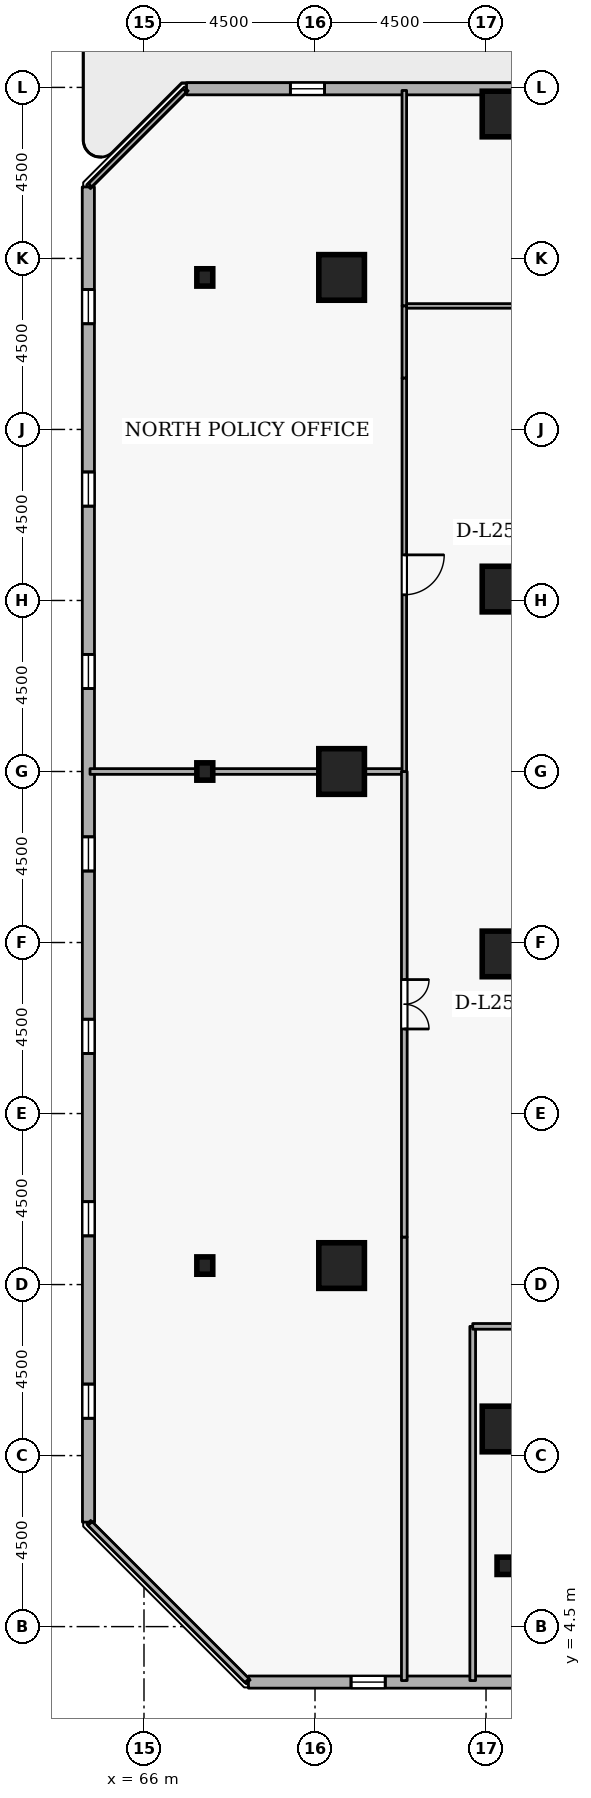
"""IFC4 building model, lengths in metres.
Left out: names, types, materials, properties, quantities, classifications, styles, units other than length and angle.
Written with IfcOpenShell. Run it as: python <this file> out.ifc"""

import sys

from ifc_helpers import new_model, si_unit, direction, frame, frame_2d, origin, origin_2d, place, context, subcontext, project, spatial, rectangle, i_section, extrude, element, fill, save


model = new_model("IFC4")
c1 = context("Model", 3, precision=1e-05, world=origin(), true_north=direction((0.0, 1.0)))
c2 = subcontext(c1, "Body", "Model", "MODEL_VIEW")
j1 = project(units=[si_unit("LENGTHUNIT", "METRE"), si_unit("PLANEANGLEUNIT", "RADIAN")], contexts=[c1])
p1 = place(None, origin())
s1 = spatial("IfcSite", under=j1, at=p1, CompositionType="ELEMENT")
p2 = place(p1, origin())
s2 = spatial("IfcBuilding", under=s1, at=p2, CompositionType="ELEMENT")
p3 = place(p2, frame((0.0, 0.0, 98.1)))
s3 = spatial("IfcBuildingStorey", under=s2, at=p3, CompositionType="ELEMENT", Elevation=98.1)
for number, where, z_axis, x_axis in (
    (1, (75.5, 44.3, 0.0), (0.0, 0.0, 1.0), (1.0, 0.0, 0.0)),
    (2, (71.2, 14.0, 0.0), (0.0, 0.0, 1.0), (1.0, 0.0, 0.0)),
    (3, (71.2, 27.0, 0.0), (0.0, 0.0, 1.0), (1.0, 0.0, 0.0)),
    (4, (71.2, 40.0, 0.0), (0.0, 0.0, 1.0), (1.0, 0.0, 0.0)),
    (5, (75.5, 9.7, 0.0), (0.0, 0.0, 1.0), (1.0, 0.0, 0.0)),
    (6, (75.5, 22.2, 0.0), (0.0, 0.0, 1.0), (1.0, 0.0, 0.0)),
    (7, (75.5, 31.8, 0.0), (0.0, 0.0, 1.0), (1.0, 0.0, 0.0)),
):
    element("IfcColumn", number, at=place(p3, frame(where, z_axis=z_axis, x_axis=x_axis)), inside=s3, PredefinedType="COLUMN", context=c2, shape_type="SweptSolid", body=[
        extrude(rectangle(XDim=1.2, YDim=1.2, at=origin_2d()), origin(), (0.0, 0.0, 1.0), 3.6),
    ])
for number, where, z_axis, x_axis in (
    (8, (67.6, 14.0, 0.0), (0.0, 0.0, 1.0), (1.0, 0.0, 0.0)),
    (9, (67.6, 27.0, 0.0), (0.0, 0.0, 1.0), (1.0, 0.0, 0.0)),
    (10, (67.6, 40.0, 0.0), (0.0, 0.0, 1.0), (1.0, 0.0, 0.0)),
    (11, (75.5, 6.1, 0.0), (0.0, 0.0, 1.0), (1.0, 0.0, 0.0)),
):
    element("IfcColumn", number, at=place(p3, frame(where, z_axis=z_axis, x_axis=x_axis)), inside=s3, PredefinedType="COLUMN", context=c2, shape_type="SweptSolid", body=[
        extrude(i_section(OverallWidth=0.418, OverallDepth=0.456, WebThickness=0.042, FlangeThickness=0.067, FilletRadius=0.015, at=origin_2d()), origin(), (0.0, 0.0, 1.0), 3.6),
    ])
p4 = place(p3, frame((68.748, 3.041, 0.0), z_axis=(0.0, 0.0, 1.0), x_axis=(0.999999989352, -0.000145929605, 0.0)))
e12 = element("IfcWall", 12, at=p4, inside=s3, PredefinedType="STANDARD", context=c2, shape_type="SweptSolid", body=[
    extrude(rectangle(XDim=35.133, YDim=0.32, at=frame_2d((17.566, 0.0))), origin(), (0.0, 0.0, 1.0), 2.7),
])
p5 = place(p4, frame((2.7, 0.0, 0.72)))
e13 = element("IfcOpeningElement", 13, at=p5, cuts=e12, PredefinedType="OPENING", context=c2, shape_type="SweptSolid", body=[
    extrude(rectangle(XDim=0.9, YDim=1.75, at=frame_2d((0.45, 0.875))), frame((0.0, 0.17, 0.0), z_axis=(0.0, -1.0, 0.0), x_axis=(1.0, 0.0, 0.0)), (0.0, 0.0, 1.0), 0.34),
])
p6 = place(p4, frame((7.5, 0.0, 0.72)))
e14 = element("IfcOpeningElement", 14, at=p6, cuts=e12, PredefinedType="OPENING", context=c2, shape_type="SweptSolid", body=[
    extrude(rectangle(XDim=0.9, YDim=1.75, at=frame_2d((0.45, 0.875))), frame((0.0, 0.17, 0.0), z_axis=(0.0, -1.0, 0.0), x_axis=(1.0, 0.0, 0.0)), (0.0, 0.0, 1.0), 0.34),
])
p7 = place(p4, frame((12.3, 0.0, 0.72)))
e15 = element("IfcOpeningElement", 15, at=p7, cuts=e12, PredefinedType="OPENING", context=c2, shape_type="SweptSolid", body=[
    extrude(rectangle(XDim=0.9, YDim=1.75, at=frame_2d((0.45, 0.875))), frame((0.0, 0.17, 0.0), z_axis=(0.0, -1.0, 0.0), x_axis=(1.0, 0.0, 0.0)), (0.0, 0.0, 1.0), 0.34),
])
p8 = place(p4, frame((17.1, 0.0, 0.72)))
e16 = element("IfcOpeningElement", 16, at=p8, cuts=e12, PredefinedType="OPENING", context=c2, shape_type="SweptSolid", body=[
    extrude(rectangle(XDim=0.9, YDim=1.75, at=frame_2d((0.45, 0.875))), frame((0.0, 0.17, 0.0), z_axis=(0.0, -1.0, 0.0), x_axis=(1.0, 0.0, 0.0)), (0.0, 0.0, 1.0), 0.34),
])
p9 = place(p4, frame((21.9, 0.0, 0.72)))
e17 = element("IfcOpeningElement", 17, at=p9, cuts=e12, PredefinedType="OPENING", context=c2, shape_type="SweptSolid", body=[
    extrude(rectangle(XDim=0.9, YDim=1.75, at=frame_2d((0.45, 0.875))), frame((0.0, 0.17, 0.0), z_axis=(0.0, -1.0, 0.0), x_axis=(1.0, 0.0, 0.0)), (0.0, 0.0, 1.0), 0.34),
])
p10 = place(p4, frame((26.7, 0.0, 0.72)))
e18 = element("IfcOpeningElement", 18, at=p10, cuts=e12, PredefinedType="OPENING", context=c2, shape_type="SweptSolid", body=[
    extrude(rectangle(XDim=0.9, YDim=1.75, at=frame_2d((0.45, 0.875))), frame((0.0, 0.17, 0.0), z_axis=(0.0, -1.0, 0.0), x_axis=(1.0, 0.0, 0.0)), (0.0, 0.0, 1.0), 0.34),
])
p11 = place(p4, frame((31.5, 0.0, 0.72)))
e19 = element("IfcOpeningElement", 19, at=p11, cuts=e12, PredefinedType="OPENING", context=c2, shape_type="SweptSolid", body=[
    extrude(rectangle(XDim=0.9, YDim=1.75, at=frame_2d((0.45, 0.875))), frame((0.0, 0.17, 0.0), z_axis=(0.0, -1.0, 0.0), x_axis=(1.0, 0.0, 0.0)), (0.0, 0.0, 1.0), 0.34),
])
p12 = place(p3, frame((102.252, 44.959, 0.0), z_axis=(0.0, 0.0, 1.0), x_axis=(-0.999999989352, 0.000145929605, 0.0)))
e20 = element("IfcWall", 20, at=p12, inside=s3, PredefinedType="STANDARD", context=c2, shape_type="SweptSolid", body=[
    extrude(rectangle(XDim=35.133, YDim=0.32, at=frame_2d((17.566, 0.0))), origin(), (0.0, 0.0, 1.0), 2.7),
])
p13 = place(p12, frame((19.292, 0.0, 0.0)))
e21 = element("IfcOpeningElement", 21, at=p13, cuts=e20, PredefinedType="OPENING", context=c2, shape_type="SweptSolid", body=[
    extrude(rectangle(XDim=1.15, YDim=2.1, at=frame_2d((0.575, 1.05))), frame((0.0, 0.17, 0.0), z_axis=(0.0, -1.0, 0.0), x_axis=(1.0, 0.0, 0.0)), (0.0, 0.0, 1.0), 0.34),
])
p14 = place(p12, frame((2.7, 0.0, 0.72)))
e22 = element("IfcOpeningElement", 22, at=p14, cuts=e20, PredefinedType="OPENING", context=c2, shape_type="SweptSolid", body=[
    extrude(rectangle(XDim=0.9, YDim=1.75, at=frame_2d((0.45, 0.875))), frame((0.0, 0.17, 0.0), z_axis=(0.0, -1.0, 0.0), x_axis=(1.0, 0.0, 0.0)), (0.0, 0.0, 1.0), 0.34),
])
p15 = place(p12, frame((7.5, 0.0, 0.72)))
e23 = element("IfcOpeningElement", 23, at=p15, cuts=e20, PredefinedType="OPENING", context=c2, shape_type="SweptSolid", body=[
    extrude(rectangle(XDim=0.9, YDim=1.75, at=frame_2d((0.45, 0.875))), frame((0.0, 0.17, 0.0), z_axis=(0.0, -1.0, 0.0), x_axis=(1.0, 0.0, 0.0)), (0.0, 0.0, 1.0), 0.34),
])
p16 = place(p12, frame((17.1, 0.0, 0.72)))
e24 = element("IfcOpeningElement", 24, at=p16, cuts=e20, PredefinedType="OPENING", context=c2, shape_type="SweptSolid", body=[
    extrude(rectangle(XDim=0.9, YDim=1.75, at=frame_2d((0.45, 0.875))), frame((0.0, 0.17, 0.0), z_axis=(0.0, -1.0, 0.0), x_axis=(1.0, 0.0, 0.0)), (0.0, 0.0, 1.0), 0.34),
])
p17 = place(p12, frame((21.9, 0.0, 0.72)))
e25 = element("IfcOpeningElement", 25, at=p17, cuts=e20, PredefinedType="OPENING", context=c2, shape_type="SweptSolid", body=[
    extrude(rectangle(XDim=0.9, YDim=1.75, at=frame_2d((0.45, 0.875))), frame((0.0, 0.17, 0.0), z_axis=(0.0, -1.0, 0.0), x_axis=(1.0, 0.0, 0.0)), (0.0, 0.0, 1.0), 0.34),
])
p18 = place(p12, frame((31.5, 0.0, 0.72)))
e26 = element("IfcOpeningElement", 26, at=p18, cuts=e20, PredefinedType="OPENING", context=c2, shape_type="SweptSolid", body=[
    extrude(rectangle(XDim=0.9, YDim=1.75, at=frame_2d((0.45, 0.875))), frame((0.0, 0.17, 0.0), z_axis=(0.0, -1.0, 0.0), x_axis=(1.0, 0.0, 0.0)), (0.0, 0.0, 1.0), 0.34),
])
p19 = place(p3, frame((64.535, 42.381, 0.0), z_axis=(0.0, 0.0, 1.0), x_axis=(0.000145929605, -0.999999989352, 0.0)))
e27 = element("IfcWall", 27, at=p19, inside=s3, PredefinedType="STANDARD", context=c2, shape_type="SweptSolid", body=[
    extrude(rectangle(XDim=35.133, YDim=0.32, at=frame_2d((17.566, 0.0))), origin(), (0.0, 0.0, 1.0), 2.7),
])
p20 = place(p19, frame((2.7, 0.0, 0.72)))
e28 = element("IfcOpeningElement", 28, at=p20, cuts=e27, PredefinedType="OPENING", context=c2, shape_type="SweptSolid", body=[
    extrude(rectangle(XDim=0.9, YDim=1.75, at=frame_2d((0.45, 0.875))), frame((0.0, 0.17, 0.0), z_axis=(0.0, -1.0, 0.0), x_axis=(1.0, 0.0, 0.0)), (0.0, 0.0, 1.0), 0.34),
])
p21 = place(p19, frame((7.5, 0.0, 0.72)))
e29 = element("IfcOpeningElement", 29, at=p21, cuts=e27, PredefinedType="OPENING", context=c2, shape_type="SweptSolid", body=[
    extrude(rectangle(XDim=0.9, YDim=1.75, at=frame_2d((0.45, 0.875))), frame((0.0, 0.17, 0.0), z_axis=(0.0, -1.0, 0.0), x_axis=(1.0, 0.0, 0.0)), (0.0, 0.0, 1.0), 0.34),
])
p22 = place(p19, frame((12.3, 0.0, 0.72)))
e30 = element("IfcOpeningElement", 30, at=p22, cuts=e27, PredefinedType="OPENING", context=c2, shape_type="SweptSolid", body=[
    extrude(rectangle(XDim=0.9, YDim=1.75, at=frame_2d((0.45, 0.875))), frame((0.0, 0.17, 0.0), z_axis=(0.0, -1.0, 0.0), x_axis=(1.0, 0.0, 0.0)), (0.0, 0.0, 1.0), 0.34),
])
p23 = place(p19, frame((17.1, 0.0, 0.72)))
e31 = element("IfcOpeningElement", 31, at=p23, cuts=e27, PredefinedType="OPENING", context=c2, shape_type="SweptSolid", body=[
    extrude(rectangle(XDim=0.9, YDim=1.75, at=frame_2d((0.45, 0.875))), frame((0.0, 0.17, 0.0), z_axis=(0.0, -1.0, 0.0), x_axis=(1.0, 0.0, 0.0)), (0.0, 0.0, 1.0), 0.34),
])
p24 = place(p19, frame((21.9, 0.0, 0.72)))
e32 = element("IfcOpeningElement", 32, at=p24, cuts=e27, PredefinedType="OPENING", context=c2, shape_type="SweptSolid", body=[
    extrude(rectangle(XDim=0.9, YDim=1.75, at=frame_2d((0.45, 0.875))), frame((0.0, 0.17, 0.0), z_axis=(0.0, -1.0, 0.0), x_axis=(1.0, 0.0, 0.0)), (0.0, 0.0, 1.0), 0.34),
])
p25 = place(p19, frame((26.7, 0.0, 0.72)))
e33 = element("IfcOpeningElement", 33, at=p25, cuts=e27, PredefinedType="OPENING", context=c2, shape_type="SweptSolid", body=[
    extrude(rectangle(XDim=0.9, YDim=1.75, at=frame_2d((0.45, 0.875))), frame((0.0, 0.17, 0.0), z_axis=(0.0, -1.0, 0.0), x_axis=(1.0, 0.0, 0.0)), (0.0, 0.0, 1.0), 0.34),
])
p26 = place(p19, frame((31.5, 0.0, 0.72)))
e34 = element("IfcOpeningElement", 34, at=p26, cuts=e27, PredefinedType="OPENING", context=c2, shape_type="SweptSolid", body=[
    extrude(rectangle(XDim=0.9, YDim=1.75, at=frame_2d((0.45, 0.875))), frame((0.0, 0.17, 0.0), z_axis=(0.0, -1.0, 0.0), x_axis=(1.0, 0.0, 0.0)), (0.0, 0.0, 1.0), 0.34),
])
p27 = place(p3, frame((74.65, 3.08, 0.0), z_axis=(0.0, 0.0, 1.0), x_axis=(0.0, 1.0, 0.0)))
e35 = element("IfcWall", 35, at=p27, inside=s3, PredefinedType="PARTITIONING", context=c2, shape_type="SweptSolid", body=[
    extrude(rectangle(XDim=9.32, YDim=0.15, at=frame_2d((4.66, 0.0))), origin(), (0.0, 0.0, 1.0), 3.3),
])
p28 = place(p3, frame((74.65, 12.4, 0.0), z_axis=(0.0, 0.0, 1.0), x_axis=(1.0, 0.0, 0.0)))
e36 = element("IfcWall", 36, at=p28, inside=s3, PredefinedType="PARTITIONING", context=c2, shape_type="SweptSolid", body=[
    extrude(rectangle(XDim=4.802, YDim=0.15, at=frame_2d((2.401, 0.0))), origin(), (0.0, 0.0, 1.0), 3.3),
])
p29 = place(p3, frame((82.2, 39.25, 0.0), z_axis=(0.0, 0.0, 1.0), x_axis=(-1.0, 0.0, 0.0)))
e37 = element("IfcWall", 37, at=p29, inside=s3, PredefinedType="PARTITIONING", context=c2, shape_type="SweptSolid", body=[
    extrude(rectangle(XDim=9.35, YDim=0.12, at=frame_2d((4.675, 0.0))), origin(), (0.0, 0.0, 1.0), 3.3),
])
p30 = place(p29, frame((4.15, 0.0, 0.0)))
e38 = element("IfcOpeningElement", 38, at=p30, cuts=e37, PredefinedType="OPENING", context=c2, shape_type="SweptSolid", body=[
    extrude(rectangle(XDim=1.05, YDim=2.1, at=frame_2d((0.525, 1.05))), frame((0.0, 0.07, 0.0), z_axis=(0.0, -1.0, 0.0), x_axis=(1.0, 0.0, 0.0)), (0.0, 0.0, 1.0), 0.14),
])
p31 = place(p3, frame((72.85, 39.25, 0.0), z_axis=(0.0, 0.0, 1.0), x_axis=(0.0, 1.0, 0.0)))
e39 = element("IfcWall", 39, at=p31, inside=s3, PredefinedType="PARTITIONING", context=c2, shape_type="SweptSolid", body=[
    extrude(rectangle(XDim=5.67, YDim=0.12, at=frame_2d((2.835, 0.0))), origin(), (0.0, 0.0, 1.0), 3.3),
])
p32 = place(p3, frame((72.85, 14.75, 0.0), z_axis=(0.0, 0.0, 1.0), x_axis=(0.0, -1.0, 0.0)))
e40 = element("IfcWall", 40, at=p32, inside=s3, PredefinedType="PARTITIONING", context=c2, shape_type="SweptSolid", body=[
    extrude(rectangle(XDim=11.67, YDim=0.15, at=frame_2d((5.835, 0.0))), origin(), (0.0, 0.0, 1.0), 3.3),
])
p33 = place(p3, frame((68.711, 3.08, 0.0), z_axis=(0.0, 0.0, 1.0), x_axis=(-0.707106781187, 0.707106781187, 0.0)))
e41 = element("IfcWall", 41, at=p33, inside=s3, PredefinedType="PARTITIONING", context=c2, shape_type="SweptSolid", body=[
    extrude(rectangle(XDim=5.842, YDim=0.15, at=frame_2d((2.921, 0.0))), origin(), (0.0, 0.0, 1.0), 3.3),
])
p34 = place(p3, frame((64.58, 27.0, 0.0), z_axis=(0.0, 0.0, 1.0), x_axis=(1.0, 0.0, 0.0)))
e42 = element("IfcWall", 42, at=p34, inside=s3, PredefinedType="PARTITIONING", context=c2, shape_type="SweptSolid", body=[
    extrude(rectangle(XDim=8.27, YDim=0.15, at=frame_2d((4.135, 0.0))), origin(), (0.0, 0.0, 1.0), 2.838),
])
p35 = place(p3, frame((72.85, 27.0, 0.0), z_axis=(0.0, 0.0, 1.0), x_axis=(0.0, -1.0, 0.0)))
e43 = element("IfcWall", 43, at=p35, inside=s3, PredefinedType="PARTITIONING", context=c2, shape_type="SweptSolid", body=[
    extrude(rectangle(XDim=12.25, YDim=0.15, at=frame_2d((6.125, 0.0))), origin(), (0.0, 0.0, 1.0), 3.3),
])
p36 = place(p35, frame((5.475, 0.0, 0.0)))
e44 = element("IfcOpeningElement", 44, at=p36, cuts=e43, PredefinedType="OPENING", context=c2, shape_type="SweptSolid", body=[
    extrude(rectangle(XDim=1.3, YDim=2.12, at=frame_2d((0.65, 1.06))), frame((0.0, 0.085, 0.0), z_axis=(0.0, -1.0, 0.0), x_axis=(1.0, 0.0, 0.0)), (0.0, 0.0, 1.0), 0.17),
])
p37 = place(p3, frame((64.58, 42.425, 0.0), z_axis=(0.0, 0.0, 1.0), x_axis=(0.707106781187, 0.707106781187, 0.0)))
e45 = element("IfcWall", 45, at=p37, inside=s3, PredefinedType="PARTITIONING", context=c2, shape_type="SweptSolid", body=[
    extrude(rectangle(XDim=3.528, YDim=0.12, at=frame_2d((1.764, 0.0))), origin(), (0.0, 0.0, 1.0), 3.3),
])
p38 = place(p3, frame((72.85, 39.25, 0.0), z_axis=(0.0, 0.0, 1.0), x_axis=(0.0, -1.0, 0.0)))
e46 = element("IfcWall", 46, at=p38, inside=s3, PredefinedType="PARTITIONING", context=c2, shape_type="SweptSolid", body=[
    extrude(rectangle(XDim=1.9, YDim=0.12, at=frame_2d((0.95, 0.0))), origin(), (0.0, 0.0, 1.0), 3.3),
])
p39 = place(p3, frame((72.85, 37.35, 0.0), z_axis=(0.0, 0.0, 1.0), x_axis=(0.0, -1.0, 0.0)))
e47 = element("IfcWall", 47, at=p39, inside=s3, PredefinedType="PARTITIONING", context=c2, shape_type="SweptSolid", body=[
    extrude(rectangle(XDim=10.35, YDim=0.12, at=frame_2d((5.175, 0.0))), origin(), (0.0, 0.0, 1.0), 2.855),
])
p40 = place(p39, frame((4.65, 0.0, 0.0)))
e48 = element("IfcOpeningElement", 48, at=p40, cuts=e47, PredefinedType="OPENING", context=c2, shape_type="SweptSolid", body=[
    extrude(rectangle(XDim=1.05, YDim=2.1, at=frame_2d((0.525, 1.05))), frame((0.0, 0.07, 0.0), z_axis=(0.0, -1.0, 0.0), x_axis=(1.0, 0.0, 0.0)), (0.0, 0.0, 1.0), 0.14),
])
p41 = place(p5, origin())
e49 = element("IfcWindow", 49, at=p41, inside=s3, PartitioningType="SINGLE_PANEL", PredefinedType="WINDOW", context=c2, shape_type="SweptSolid", body=[
    extrude(rectangle(XDim=0.9, YDim=1.75, at=frame_2d((0.45, 0.875))), frame((0.0, 0.03, 0.0), z_axis=(0.0, -1.0, 0.0), x_axis=(1.0, 0.0, 0.0)), (0.0, 0.0, 1.0), 0.06),
])
fill(e13, e49)
p42 = place(p18, origin())
e50 = element("IfcWindow", 50, at=p42, inside=s3, PartitioningType="SINGLE_PANEL", PredefinedType="WINDOW", context=c2, shape_type="SweptSolid", body=[
    extrude(rectangle(XDim=0.9, YDim=1.75, at=frame_2d((0.45, 0.875))), frame((0.0, 0.03, 0.0), z_axis=(0.0, -1.0, 0.0), x_axis=(1.0, 0.0, 0.0)), (0.0, 0.0, 1.0), 0.06),
])
fill(e26, e50)
p43 = place(p20, origin())
e51 = element("IfcWindow", 51, at=p43, inside=s3, PartitioningType="SINGLE_PANEL", PredefinedType="WINDOW", context=c2, shape_type="SweptSolid", body=[
    extrude(rectangle(XDim=0.9, YDim=1.75, at=frame_2d((0.45, 0.875))), frame((0.0, 0.03, 0.0), z_axis=(0.0, -1.0, 0.0), x_axis=(1.0, 0.0, 0.0)), (0.0, 0.0, 1.0), 0.06),
])
fill(e28, e51)
p44 = place(p21, origin())
e52 = element("IfcWindow", 52, at=p44, inside=s3, PartitioningType="SINGLE_PANEL", PredefinedType="WINDOW", context=c2, shape_type="SweptSolid", body=[
    extrude(rectangle(XDim=0.9, YDim=1.75, at=frame_2d((0.45, 0.875))), frame((0.0, 0.03, 0.0), z_axis=(0.0, -1.0, 0.0), x_axis=(1.0, 0.0, 0.0)), (0.0, 0.0, 1.0), 0.06),
])
fill(e29, e52)
p45 = place(p22, origin())
e53 = element("IfcWindow", 53, at=p45, inside=s3, PartitioningType="SINGLE_PANEL", PredefinedType="WINDOW", context=c2, shape_type="SweptSolid", body=[
    extrude(rectangle(XDim=0.9, YDim=1.75, at=frame_2d((0.45, 0.875))), frame((0.0, 0.03, 0.0), z_axis=(0.0, -1.0, 0.0), x_axis=(1.0, 0.0, 0.0)), (0.0, 0.0, 1.0), 0.06),
])
fill(e30, e53)
p46 = place(p23, origin())
e54 = element("IfcWindow", 54, at=p46, inside=s3, PartitioningType="SINGLE_PANEL", PredefinedType="WINDOW", context=c2, shape_type="SweptSolid", body=[
    extrude(rectangle(XDim=0.9, YDim=1.75, at=frame_2d((0.45, 0.875))), frame((0.0, 0.03, 0.0), z_axis=(0.0, -1.0, 0.0), x_axis=(1.0, 0.0, 0.0)), (0.0, 0.0, 1.0), 0.06),
])
fill(e31, e54)
p47 = place(p24, origin())
e55 = element("IfcWindow", 55, at=p47, inside=s3, PartitioningType="SINGLE_PANEL", PredefinedType="WINDOW", context=c2, shape_type="SweptSolid", body=[
    extrude(rectangle(XDim=0.9, YDim=1.75, at=frame_2d((0.45, 0.875))), frame((0.0, 0.03, 0.0), z_axis=(0.0, -1.0, 0.0), x_axis=(1.0, 0.0, 0.0)), (0.0, 0.0, 1.0), 0.06),
])
fill(e32, e55)
p48 = place(p25, origin())
e56 = element("IfcWindow", 56, at=p48, inside=s3, PartitioningType="SINGLE_PANEL", PredefinedType="WINDOW", context=c2, shape_type="SweptSolid", body=[
    extrude(rectangle(XDim=0.9, YDim=1.75, at=frame_2d((0.45, 0.875))), frame((0.0, 0.03, 0.0), z_axis=(0.0, -1.0, 0.0), x_axis=(1.0, 0.0, 0.0)), (0.0, 0.0, 1.0), 0.06),
])
fill(e33, e56)
p49 = place(p26, origin())
e57 = element("IfcWindow", 57, at=p49, inside=s3, PartitioningType="SINGLE_PANEL", PredefinedType="WINDOW", context=c2, shape_type="SweptSolid", body=[
    extrude(rectangle(XDim=0.9, YDim=1.75, at=frame_2d((0.45, 0.875))), frame((0.0, 0.03, 0.0), z_axis=(0.0, -1.0, 0.0), x_axis=(1.0, 0.0, 0.0)), (0.0, 0.0, 1.0), 0.06),
])
fill(e34, e57)
p50 = place(p36, origin())
e58 = element("IfcDoor", 58, at=p50, inside=s3, OperationType="DOUBLE_DOOR_SINGLE_SWING", PredefinedType="DOOR", context=c2, shape_type="SweptSolid", body=[
    extrude(rectangle(XDim=1.3, YDim=2.12, at=frame_2d((0.65, 1.06))), frame((0.0, 0.025, 0.0), z_axis=(0.0, -1.0, 0.0), x_axis=(1.0, 0.0, 0.0)), (0.0, 0.0, 1.0), 0.05),
])
fill(e44, e58)
p51 = place(p40, origin())
e59 = element("IfcDoor", 59, at=p51, inside=s3, OperationType="SINGLE_SWING_LEFT", PredefinedType="DOOR", context=c2, shape_type="SweptSolid", body=[
    extrude(rectangle(XDim=1.05, YDim=2.1, at=frame_2d((0.525, 1.05))), frame((0.0, 0.025, 0.0), z_axis=(0.0, -1.0, 0.0), x_axis=(1.0, 0.0, 0.0)), (0.0, 0.0, 1.0), 0.05),
])
fill(e48, e59)
save(model, sys.argv[1])
